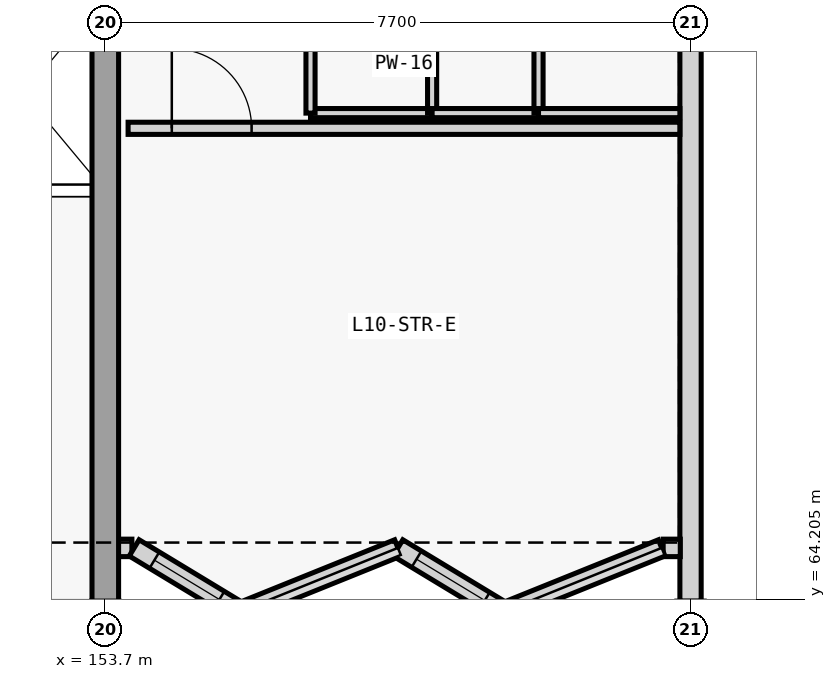
"""IFC4 building model, lengths in metres.
Left out: names, types, materials, properties, quantities, classifications, styles, units other than length and angle.
Written with IfcOpenShell. Run it as: python <this file> out.ifc"""

import sys

from ifc_helpers import new_model, si_unit, direction, frame, frame_2d, origin, place, context, subcontext, project, spatial, rectangle, extrude, element, fill, save


model = new_model("IFC4")
c1 = context("Model", 3, precision=1e-05, world=origin(), true_north=direction((0.0, 1.0)))
c2 = subcontext(c1, "Body", "Model", "MODEL_VIEW")
j1 = project(units=[si_unit("LENGTHUNIT", "METRE"), si_unit("PLANEANGLEUNIT", "RADIAN")], contexts=[c1])
p1 = place(None, origin())
s1 = spatial("IfcSite", under=j1, at=p1, CompositionType="ELEMENT")
p2 = place(p1, origin())
s2 = spatial("IfcBuilding", under=s1, at=p2, CompositionType="ELEMENT")
p3 = place(p2, frame((0.0, 0.0, 39.6)))
s3 = spatial("IfcBuildingStorey", under=s2, at=p3, CompositionType="ELEMENT", Elevation=39.6)
p4 = place(p3, frame((161.4, 96.822, 0.0), z_axis=(0.0, 0.0, 1.0), x_axis=(0.0, -1.0, 0.0)))
e1 = element("IfcWall", 1, at=p4, inside=s3, PredefinedType="SOLIDWALL", context=c2, shape_type="SweptSolid", body=[
    extrude(rectangle(XDim=32.644, YDim=0.28, at=frame_2d((16.322, 0.0))), origin(), (0.0, 0.0, 1.0), 2.79),
])
p5 = place(p4, frame((17.522, 0.0, 0.82)))
e2 = element("IfcOpeningElement", 2, at=p5, cuts=e1, PredefinedType="OPENING", context=c2, shape_type="SweptSolid", body=[
    extrude(rectangle(XDim=4.2, YDim=1.5, at=frame_2d((2.1, 0.75))), frame((0.0, 0.15, 0.0), z_axis=(0.0, -1.0, 0.0), x_axis=(1.0, 0.0, 0.0)), (0.0, 0.0, 1.0), 0.3),
])
p6 = place(p3, frame((154.05, 64.88, 0.0), z_axis=(0.0, 0.0, 1.0), x_axis=(-1.0, 0.0, 0.0)))
e3 = element("IfcWall", 3, at=p6, inside=s3, PredefinedType="SOLIDWALL", context=c2, shape_type="SweptSolid", body=[
    extrude(rectangle(XDim=0.18, YDim=0.23, at=frame_2d((0.09, 0.0))), origin(), (0.0, 0.0, 1.0), 3.36),
])
p7 = place(p3, frame((161.265, 64.88, 0.0), z_axis=(0.0, 0.0, 1.0), x_axis=(-1.0, 0.0, 0.0)))
e4 = element("IfcWall", 4, at=p7, inside=s3, PredefinedType="SOLIDWALL", context=c2, shape_type="SweptSolid", body=[
    extrude(rectangle(XDim=0.225, YDim=0.23, at=frame_2d((0.112, 0.0))), origin(), (0.0, 0.0, 1.0), 3.36),
])
p8 = place(p3, frame((155.468, 64.04, 0.0), z_axis=(0.0, 0.0, 1.0), x_axis=(-0.855561475997, 0.51770122734, 0.0)))
e5 = element("IfcWall", 5, at=p8, inside=s3, PredefinedType="SOLIDWALL", context=c2, shape_type="SweptSolid", body=[
    extrude(rectangle(XDim=1.622, YDim=0.25, at=frame_2d((0.811, 0.0))), origin(), (0.0, 0.0, 1.0), 3.36),
])
p9 = place(p8, frame((0.311, 0.0, 0.82)))
e6 = element("IfcOpeningElement", 6, at=p9, cuts=e5, PredefinedType="OPENING", context=c2, shape_type="SweptSolid", body=[
    extrude(rectangle(XDim=1.0, YDim=1.35, at=frame_2d((0.5, 0.675))), frame((0.0, 0.135, 0.0), z_axis=(0.0, -1.0, 0.0), x_axis=(1.0, 0.0, 0.0)), (0.0, 0.0, 1.0), 0.27),
])
p10 = place(p3, frame((157.55, 64.88, 0.0), z_axis=(0.0, 0.0, 1.0), x_axis=(-0.927392797001, -0.374089026933, 0.0)))
e7 = element("IfcWall", 7, at=p10, inside=s3, PredefinedType="SOLIDWALL", context=c2, shape_type="SweptSolid", body=[
    extrude(rectangle(XDim=2.245, YDim=0.23, at=frame_2d((1.123, 0.0))), origin(), (0.0, 0.0, 1.0), 3.36),
])
p11 = place(p3, frame((158.938, 64.04, 0.0), z_axis=(0.0, 0.0, 1.0), x_axis=(-0.855561475997, 0.51770122734, 0.0)))
e8 = element("IfcWall", 8, at=p11, inside=s3, PredefinedType="SOLIDWALL", context=c2, shape_type="SweptSolid", body=[
    extrude(rectangle(XDim=1.622, YDim=0.25, at=frame_2d((0.811, 0.0))), origin(), (0.0, 0.0, 1.0), 3.36),
])
p12 = place(p11, frame((0.286, 0.0, 0.82)))
e9 = element("IfcOpeningElement", 9, at=p12, cuts=e8, PredefinedType="OPENING", context=c2, shape_type="SweptSolid", body=[
    extrude(rectangle(XDim=1.05, YDim=1.4, at=frame_2d((0.525, 0.7))), frame((0.0, 0.135, 0.0), z_axis=(0.0, -1.0, 0.0), x_axis=(1.0, 0.0, 0.0)), (0.0, 0.0, 1.0), 0.27),
])
p13 = place(p3, frame((161.02, 64.88, 0.0), z_axis=(0.0, 0.0, 1.0), x_axis=(-0.927392797001, -0.374089026933, 0.0)))
e10 = element("IfcWall", 10, at=p13, inside=s3, PredefinedType="SOLIDWALL", context=c2, shape_type="SweptSolid", body=[
    extrude(rectangle(XDim=2.245, YDim=0.23, at=frame_2d((1.123, 0.0))), origin(), (0.0, 0.0, 1.0), 3.36),
])
p14 = place(p3, frame((153.7, 64.0, 0.0), z_axis=(0.0, 0.0, 1.0), x_axis=(0.0, 1.0, 0.0)))
e11 = element("IfcWall", 11, at=p14, inside=s3, PredefinedType="SHEAR", context=c2, shape_type="SweptSolid", body=[
    extrude(rectangle(XDim=8.4, YDim=0.35, at=frame_2d((4.2, 0.0))), origin(), (0.0, 0.0, 1.0), 3.6),
])
p15 = place(p3, frame((156.4, 70.6, 0.0), z_axis=(0.0, 0.0, 1.0), x_axis=(1.0, 0.0, 0.0)))
e12 = element("IfcWall", 12, at=p15, inside=s3, PredefinedType="PARTITIONING", context=c2, shape_type="SweptSolid", body=[
    extrude(rectangle(XDim=1.6, YDim=0.12, at=frame_2d((0.8, 0.0))), origin(), (0.0, 0.0, 1.0), 3.34),
])
p16 = place(p3, frame((156.4, 70.6, 0.0), z_axis=(0.0, 0.0, 1.0), x_axis=(0.0, 1.0, 0.0)))
e13 = element("IfcWall", 13, at=p16, inside=s3, PredefinedType="PARTITIONING", context=c2, shape_type="SweptSolid", body=[
    extrude(rectangle(XDim=5.2, YDim=0.12, at=frame_2d((2.6, 0.0))), origin(), (0.0, 0.0, 1.0), 3.34),
])
p17 = place(p16, frame((2.16, 0.0, 0.0)))
e14 = element("IfcOpeningElement", 14, at=p17, cuts=e13, PredefinedType="OPENING", context=c2, shape_type="SweptSolid", body=[
    extrude(rectangle(XDim=0.88, YDim=2.1, at=frame_2d((0.44, 1.05))), frame((0.0, 0.07, 0.0), z_axis=(0.0, -1.0, 0.0), x_axis=(1.0, 0.0, 0.0)), (0.0, 0.0, 1.0), 0.14),
])
p18 = place(p3, frame((158.0, 70.6, 0.0), z_axis=(0.0, 0.0, 1.0), x_axis=(0.0, 1.0, 0.0)))
e15 = element("IfcWall", 15, at=p18, inside=s3, PredefinedType="PARTITIONING", context=c2, shape_type="SweptSolid", body=[
    extrude(rectangle(XDim=5.2, YDim=0.12, at=frame_2d((2.6, 0.0))), origin(), (0.0, 0.0, 1.0), 3.34),
])
p19 = place(p3, frame((158.0, 70.6, 0.0), z_axis=(0.0, 0.0, 1.0), x_axis=(1.0, 0.0, 0.0)))
e16 = element("IfcWall", 16, at=p19, inside=s3, PredefinedType="PARTITIONING", context=c2, shape_type="SweptSolid", body=[
    extrude(rectangle(XDim=1.4, YDim=0.12, at=frame_2d((0.7, 0.0))), origin(), (0.0, 0.0, 1.0), 3.34),
])
p20 = place(p3, frame((159.4, 70.6, 0.0), z_axis=(0.0, 0.0, 1.0), x_axis=(0.0, 1.0, 0.0)))
e17 = element("IfcWall", 17, at=p20, inside=s3, PredefinedType="PARTITIONING", context=c2, shape_type="SweptSolid", body=[
    extrude(rectangle(XDim=5.2, YDim=0.12, at=frame_2d((2.6, 0.0))), origin(), (0.0, 0.0, 1.0), 3.34),
])
p21 = place(p3, frame((159.4, 70.6, 0.0), z_axis=(0.0, 0.0, 1.0), x_axis=(1.0, 0.0, 0.0)))
e18 = element("IfcWall", 18, at=p21, inside=s3, PredefinedType="PARTITIONING", context=c2, shape_type="SweptSolid", body=[
    extrude(rectangle(XDim=1.86, YDim=0.12, at=frame_2d((0.93, 0.0))), origin(), (0.0, 0.0, 1.0), 3.34),
])
p22 = place(p3, frame((154.0, 70.4, 0.0), z_axis=(0.0, 0.0, 1.0), x_axis=(1.0, 0.0, 0.0)))
e19 = element("IfcWall", 19, at=p22, inside=s3, PredefinedType="PARTITIONING", context=c2, shape_type="SweptSolid", body=[
    extrude(rectangle(XDim=7.26, YDim=0.16, at=frame_2d((3.63, 0.0))), origin(), (0.0, 0.0, 1.0), 3.34),
])
p23 = place(p22, frame((0.575, 0.0, 0.0)))
e20 = element("IfcOpeningElement", 20, at=p23, cuts=e19, PredefinedType="OPENING", context=c2, shape_type="SweptSolid", body=[
    extrude(rectangle(XDim=1.05, YDim=2.15, at=frame_2d((0.525, 1.075))), frame((0.0, 0.09, 0.0), z_axis=(0.0, -1.0, 0.0), x_axis=(1.0, 0.0, 0.0)), (0.0, 0.0, 1.0), 0.18),
])
p24 = place(p9, origin())
e21 = element("IfcWindow", 21, at=p24, inside=s3, PartitioningType="SINGLE_PANEL", PredefinedType="WINDOW", context=c2, shape_type="SweptSolid", body=[
    extrude(rectangle(XDim=1.0, YDim=1.35, at=frame_2d((0.5, 0.675))), frame((0.0, 0.03, 0.0), z_axis=(0.0, -1.0, 0.0), x_axis=(1.0, 0.0, 0.0)), (0.0, 0.0, 1.0), 0.06),
])
fill(e6, e21)
p25 = place(p12, origin())
e22 = element("IfcWindow", 22, at=p25, inside=s3, PartitioningType="SINGLE_PANEL", PredefinedType="WINDOW", context=c2, shape_type="SweptSolid", body=[
    extrude(rectangle(XDim=1.05, YDim=1.4, at=frame_2d((0.525, 0.7))), frame((0.0, 0.03, 0.0), z_axis=(0.0, -1.0, 0.0), x_axis=(1.0, 0.0, 0.0)), (0.0, 0.0, 1.0), 0.06),
])
fill(e9, e22)
p26 = place(p23, origin())
e23 = element("IfcDoor", 23, at=p26, inside=s3, OperationType="SINGLE_SWING_LEFT", PredefinedType="DOOR", context=c2, shape_type="SweptSolid", body=[
    extrude(rectangle(XDim=1.05, YDim=2.15, at=frame_2d((0.525, 1.075))), frame((0.0, 0.025, 0.0), z_axis=(0.0, -1.0, 0.0), x_axis=(1.0, 0.0, 0.0)), (0.0, 0.0, 1.0), 0.05),
])
fill(e20, e23)
save(model, sys.argv[1])
